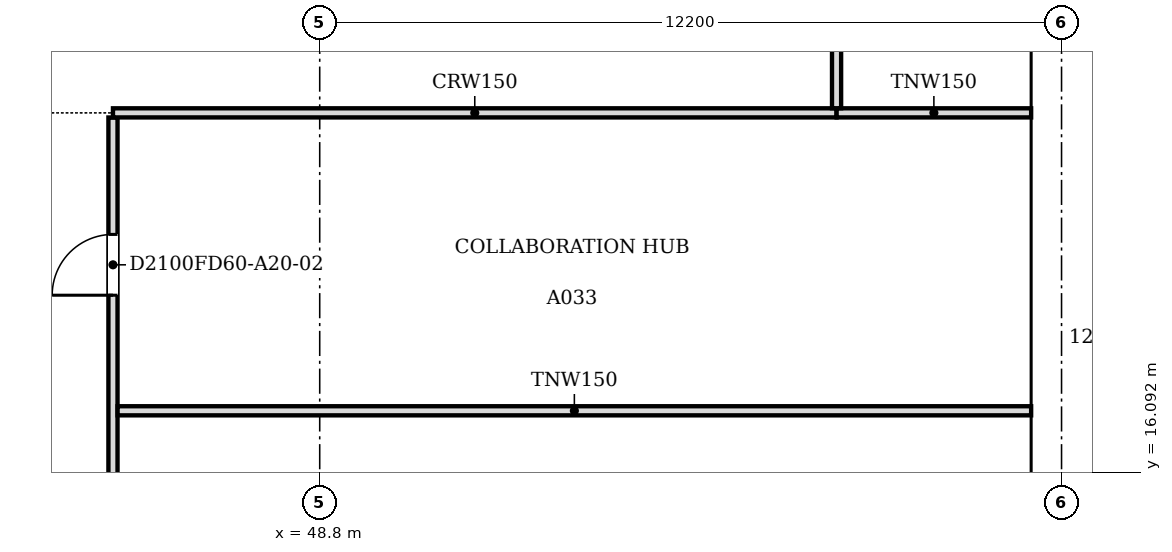
"""IFC4 building model, lengths in metres.
Left out: names, types, materials, properties, quantities, classifications, styles, units other than length and angle.
Written with IfcOpenShell. Run it as: python <this file> out.ifc"""

import sys

from ifc_helpers import new_model, si_unit, direction, frame, frame_2d, origin, place, context, subcontext, project, spatial, polyline, rectangle, outline, extrude, faceted_brep, source, transform, mapped, element, fill, save


model = new_model("IFC4")
c1 = context("Model", 3, precision=1e-05, world=origin(), true_north=direction((0.0, 1.0)))
c2 = subcontext(c1, "Body", "Model", "MODEL_VIEW")
j1 = project(units=[si_unit("LENGTHUNIT", "METRE"), si_unit("PLANEANGLEUNIT", "RADIAN")], contexts=[c1])
p1 = place(None, origin())
s1 = spatial("IfcSite", under=j1, at=p1, CompositionType="ELEMENT")
p2 = place(p1, origin())
s2 = spatial("IfcBuilding", under=s1, at=p2, CompositionType="ELEMENT")
p3 = place(p2, frame((0.0, 0.0, 220.7)))
s3 = spatial("IfcBuildingStorey", under=s2, at=p3, CompositionType="ELEMENT", Elevation=220.7)
m1 = source(origin(), c2, "Body", "SweptSolid", [
    extrude(outline(polyline([(3.05, 0.0), (6.1, 3.8), (3.05, 7.6), (0.0, 3.8), (3.05, 0.0)])), frame((0.0, 0.25, 0.0), z_axis=(0.0, -1.0, 0.0), x_axis=(1.0, 0.0, 0.0)), (0.0, 0.0, 1.0), 0.5),
])
p4 = place(p3, frame((60.75, 12.2, -3.8), z_axis=(0.0, 0.0, 1.0), x_axis=(0.0, 1.0, 0.0)))
e1 = element("IfcWall", 1, at=p4, inside=s3, PredefinedType="SOLIDWALL", context=c2, shape_type="MappedRepresentation", body=[
    mapped(m1, transform((0.0, 0.0, 0.0), scale=1.0)),
])
m2 = source(origin(), c2, "Body", "SweptSolid", [
    extrude(outline(polyline([(3.05, 0.399), (5.78, 3.8), (3.05, 7.201), (0.321, 3.8), (3.05, 0.399)])), frame((0.0, 0.26, 0.0), z_axis=(0.0, -1.0, 0.0), x_axis=(1.0, 0.0, 0.0)), (0.0, 0.0, 1.0), 0.52),
])
p5 = place(p4, origin())
e2 = element("IfcOpeningElement", 2, at=p5, cuts=e1, PredefinedType="OPENING", context=c2, shape_type="MappedRepresentation", body=[
    mapped(m2, transform((0.0, 0.0, 0.0), scale=1.0)),
])
m3 = source(origin(), c2, "Body", "Brep", [
    faceted_brep([(3.05, -0.25, 0.0), (6.1, -0.25, 3.8), (6.1, -0.25, 3.8), (3.05, -0.25, 7.6), (0.0, -0.25, 3.8), (0.0, 0.25, 3.8), (3.05, 0.25, 7.6), (6.1, 0.25, 3.8), (6.1, 0.25, 3.8), (3.05, 0.25, 0.0)], [[[0, 1, 2, 3, 4]], [[5, 6, 7, 8, 9]], [[9, 8, 1, 0]], [[7, 6, 3, 2]], [[6, 5, 4, 3]], [[5, 9, 0, 4]], [[1, 8, 7, 2]]]),
])
p6 = place(p3, frame((60.75, 18.3, -3.8), z_axis=(0.0, 0.0, 1.0), x_axis=(0.0, 1.0, 0.0)))
e3 = element("IfcWall", 3, at=p6, inside=s3, PredefinedType="SOLIDWALL", context=c2, shape_type="MappedRepresentation", body=[
    mapped(m3, transform((0.0, 0.0, 0.0), scale=1.0)),
])
p7 = place(p6, origin())
e4 = element("IfcOpeningElement", 4, at=p7, cuts=e3, PredefinedType="OPENING", context=c2, shape_type="MappedRepresentation", body=[
    mapped(m2, transform((0.0, 0.0, 0.0), scale=1.0)),
])
p8 = place(p2, frame((0.0, 0.0, 224.5)))
s4 = spatial("IfcBuildingStorey", under=s2, at=p8, CompositionType="ELEMENT", Elevation=224.5)
p9 = place(p8, frame((60.75, 15.25, -3.8), z_axis=(0.0, 0.0, 1.0), x_axis=(0.0, 1.0, 0.0)))
e5 = element("IfcWall", 5, at=p9, inside=s4, PredefinedType="SOLIDWALL", context=c2, shape_type="MappedRepresentation", body=[
    mapped(m1, transform((0.0, 0.0, 0.0), scale=1.0)),
])
p10 = place(p9, origin())
e6 = element("IfcOpeningElement", 6, at=p10, cuts=e5, PredefinedType="OPENING", context=c2, shape_type="MappedRepresentation", body=[
    mapped(m2, transform((0.0, 0.0, 0.0), scale=1.0)),
])
p11 = place(p8, frame((60.75, 21.35, -3.8), z_axis=(0.0, 0.0, 1.0), x_axis=(0.0, 1.0, 0.0)))
e7 = element("IfcWall", 7, at=p11, inside=s4, PredefinedType="SOLIDWALL", context=c2, shape_type="MappedRepresentation", body=[
    mapped(m3, transform((0.0, 0.0, 0.0), scale=1.0)),
])
p12 = place(p11, origin())
e8 = element("IfcOpeningElement", 8, at=p12, cuts=e7, PredefinedType="OPENING", context=c2, shape_type="MappedRepresentation", body=[
    mapped(m2, transform((0.0, 0.0, 0.0), scale=1.0)),
])
p13 = place(p3, frame((45.4, 21.924, 0.0), z_axis=(0.0, 0.0, 1.0), x_axis=(0.0, -1.0, 0.0)))
e9 = element("IfcWall", 9, at=p13, inside=s3, PredefinedType="PARTITIONING", context=c2, shape_type="SweptSolid", body=[
    extrude(rectangle(XDim=17.724, YDim=0.15, at=frame_2d((8.862, 0.0))), origin(), (0.0, 0.0, 1.0), 3.067),
])
m4 = source(origin(), c2, "Body", "SweptSolid", [
    extrude(rectangle(XDim=1.0, YDim=2.1, at=frame_2d((0.5, 1.05))), frame((0.0, 0.085, 0.0), z_axis=(0.0, -1.0, 0.0), x_axis=(1.0, 0.0, 0.0)), (0.0, 0.0, 1.0), 0.17),
])
p14 = place(p13, frame((1.923, 0.0, 0.0)))
e10 = element("IfcOpeningElement", 10, at=p14, cuts=e9, PredefinedType="OPENING", context=c2, shape_type="MappedRepresentation", body=[
    mapped(m4, transform((0.0, 0.0, 0.0), scale=1.0)),
])
p15 = place(p13, frame((10.824, 0.0, 0.0)))
e11 = element("IfcOpeningElement", 11, at=p15, cuts=e9, PredefinedType="OPENING", context=c2, shape_type="MappedRepresentation", body=[
    mapped(m4, transform((0.0, 0.0, 0.0), scale=1.0)),
])
p16 = place(p3, frame((45.476, 17.1, 0.0), z_axis=(0.0, 0.0, 1.0), x_axis=(1.0, 0.0, 0.0)))
e12 = element("IfcWall", 12, at=p16, inside=s3, PredefinedType="PARTITIONING", context=c2, shape_type="SweptSolid", body=[
    extrude(rectangle(XDim=15.024, YDim=0.15, at=frame_2d((7.512, 0.0))), origin(), (0.0, 0.0, 1.0), 3.067),
])
p17 = place(p3, frame((45.4, 22.0, 0.0), z_axis=(0.0, 0.0, 1.0), x_axis=(1.0, 0.0, 0.0)))
e13 = element("IfcWall", 13, at=p17, inside=s3, PredefinedType="PARTITIONING", context=c2, shape_type="SweptSolid", body=[
    extrude(rectangle(XDim=11.9, YDim=0.15, at=frame_2d((5.95, 0.0))), origin(), (0.0, 0.0, 1.0), 3.067),
])
p18 = place(p3, frame((57.301, 22.0, 0.0), z_axis=(0.0, 0.0, 1.0), x_axis=(1.0, 0.0, 0.0)))
e14 = element("IfcWall", 14, at=p18, inside=s3, PredefinedType="PARTITIONING", context=c2, shape_type="SweptSolid", body=[
    extrude(rectangle(XDim=3.199, YDim=0.15, at=frame_2d((1.6, 0.0))), origin(), (0.0, 0.0, 1.0), 3.067),
])
p19 = place(p3, frame((57.3, 30.6, 0.0), z_axis=(0.0, 0.0, 1.0), x_axis=(0.0, -1.0, 0.0)))
e15 = element("IfcWall", 15, at=p19, inside=s3, PredefinedType="PARTITIONING", context=c2, shape_type="SweptSolid", body=[
    extrude(rectangle(XDim=8.524, YDim=0.15, at=frame_2d((4.262, 0.0))), origin(), (0.0, 0.0, 1.0), 3.067),
])
m5 = source(origin(), c2, "Body", "SweptSolid", [
    extrude(rectangle(XDim=0.9, YDim=2.1, at=frame_2d((0.45, 1.05))), frame((0.0, 0.085, 0.0), z_axis=(0.0, -1.0, 0.0), x_axis=(1.0, 0.0, 0.0)), (0.0, 0.0, 1.0), 0.17),
])
p20 = place(p19, frame((3.824, 0.0, 0.0)))
e16 = element("IfcOpeningElement", 16, at=p20, cuts=e15, PredefinedType="OPENING", context=c2, shape_type="MappedRepresentation", body=[
    mapped(m5, transform((0.0, 0.0, 0.0), scale=1.0)),
])
m6 = source(origin(), c2, "Body", "SweptSolid", [
    extrude(rectangle(XDim=1.0, YDim=2.1, at=frame_2d((0.5, 1.05))), frame((0.0, 0.025, 0.0), z_axis=(0.0, -1.0, 0.0), x_axis=(1.0, 0.0, 0.0)), (0.0, 0.0, 1.0), 0.05),
])
p21 = place(p14, origin())
e17 = element("IfcDoor", 17, at=p21, inside=s3, OperationType="SINGLE_SWING_RIGHT", PredefinedType="DOOR", context=c2, shape_type="MappedRepresentation", body=[
    mapped(m6, transform((0.0, 0.0, 0.0), scale=1.0)),
])
fill(e10, e17)
save(model, sys.argv[1])
